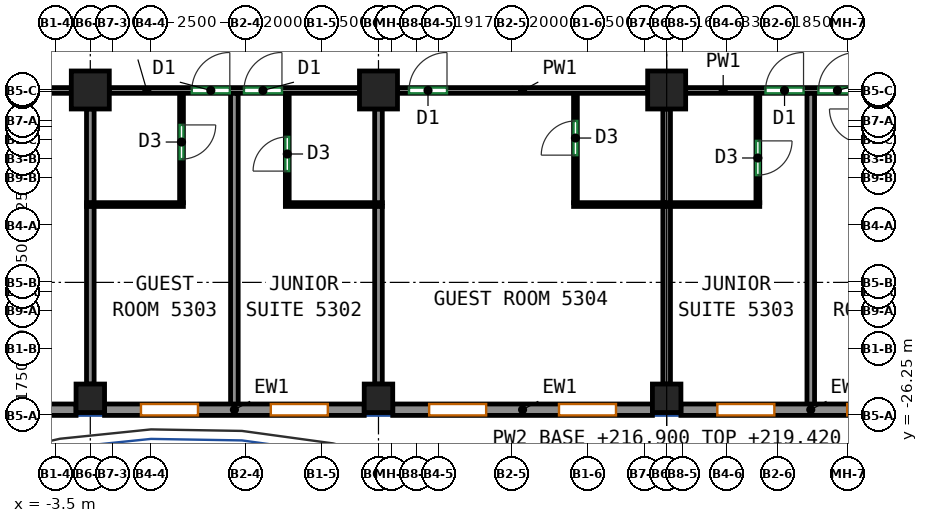
"""IFC4 building model, lengths in metres.
Left out: names, types, materials, properties, quantities, classifications, styles, units other than length and angle.
Written with IfcOpenShell. Run it as: python <this file> out.ifc"""

import sys

from ifc_helpers import new_model, si_unit, direction, frame, frame_2d, origin, origin_2d, place, context, subcontext, project, spatial, rectangle, extrude, source, transform, mapped, element, fill, save


model = new_model("IFC4")
c1 = context("Model", 3, precision=1e-05, world=origin(), true_north=direction((0.0, 1.0)))
c2 = subcontext(c1, "Body", "Model", "MODEL_VIEW")
j1 = project(units=[si_unit("LENGTHUNIT", "METRE"), si_unit("PLANEANGLEUNIT", "RADIAN")], contexts=[c1])
p1 = place(None, origin())
s1 = spatial("IfcSite", under=j1, at=p1, CompositionType="ELEMENT")
p2 = place(p1, origin())
s2 = spatial("IfcBuilding", under=s1, at=p2, CompositionType="ELEMENT")
p3 = place(p2, frame((0.0, 0.0, 216.9)))
s3 = spatial("IfcBuildingStorey", under=s2, at=p3, CompositionType="ELEMENT", Elevation=216.9)
m1 = source(origin(), c2, "Body", "SweptSolid", [
    extrude(rectangle(XDim=0.75, YDim=0.75, at=origin_2d()), origin(), (0.0, 0.0, 1.0), 3.12),
])
p4 = place(p3, frame((-2.583, -25.8, 0.0), z_axis=(0.0, 0.0, 1.0), x_axis=(1.0, 0.0, 0.0)))
e1 = element("IfcColumn", 1, at=p4, inside=s3, PredefinedType="COLUMN", context=c2, shape_type="MappedRepresentation", body=[
    mapped(m1, transform((0.0, 0.0, 0.0))),
])
m2 = source(origin(), c2, "Body", "SweptSolid", [
    extrude(rectangle(XDim=1.0, YDim=1.0, at=origin_2d()), origin(), (0.0, 0.0, 1.0), 3.12),
])
p5 = place(p3, frame((-2.583, -17.688, 0.0), z_axis=(0.0, 0.0, 1.0), x_axis=(1.0, 0.0, 0.0)))
e2 = element("IfcColumn", 2, at=p5, inside=s3, PredefinedType="COLUMN", context=c2, shape_type="MappedRepresentation", body=[
    mapped(m2, transform((0.0, 0.0, 0.0))),
])
p6 = place(p3, frame((5.0, -25.8, 0.0), z_axis=(0.0, 0.0, 1.0), x_axis=(1.0, 0.0, 0.0)))
e3 = element("IfcColumn", 3, at=p6, inside=s3, PredefinedType="COLUMN", context=c2, shape_type="MappedRepresentation", body=[
    mapped(m1, transform((0.0, 0.0, 0.0))),
])
p7 = place(p3, frame((5.0, -17.688, 0.0), z_axis=(0.0, 0.0, 1.0), x_axis=(1.0, 0.0, 0.0)))
e4 = element("IfcColumn", 4, at=p7, inside=s3, PredefinedType="COLUMN", context=c2, shape_type="MappedRepresentation", body=[
    mapped(m2, transform((0.0, 0.0, 0.0))),
])
p8 = place(p3, frame((12.583, -25.8, 0.0), z_axis=(0.0, 0.0, 1.0), x_axis=(1.0, 0.0, 0.0)))
e5 = element("IfcColumn", 5, at=p8, inside=s3, PredefinedType="COLUMN", context=c2, shape_type="MappedRepresentation", body=[
    mapped(m1, transform((0.0, 0.0, 0.0))),
])
p9 = place(p3, frame((12.583, -17.688, 0.0), z_axis=(0.0, 0.0, 1.0), x_axis=(1.0, 0.0, 0.0)))
e6 = element("IfcColumn", 6, at=p9, inside=s3, PredefinedType="COLUMN", context=c2, shape_type="MappedRepresentation", body=[
    mapped(m2, transform((0.0, 0.0, 0.0))),
])
m3 = source(origin(), c2, "Body", "SweptSolid", [
    extrude(rectangle(XDim=6.833, YDim=0.3, at=frame_2d((3.417, 0.0))), origin(), (0.0, 0.0, 1.0), 3.12),
])
p10 = place(p3, frame((-9.792, -26.1, 0.0), z_axis=(0.0, 0.0, 1.0), x_axis=(1.0, 0.0, 0.0)))
e7 = element("IfcWall", 7, at=p10, inside=s3, PredefinedType="SOLIDWALL", context=c2, shape_type="MappedRepresentation", body=[
    mapped(m3, transform((0.0, 0.0, 0.0))),
])
p11 = place(p10, frame((0.958, 0.0, 0.85)))
e8 = element("IfcOpeningElement", 8, at=p11, cuts=e7, PredefinedType="OPENING", context=c2, shape_type="SweptSolid", body=[
    extrude(rectangle(XDim=1.5, YDim=1.95, at=frame_2d((0.75, 0.975))), frame((0.0, 0.16, 0.0), z_axis=(0.0, -1.0, 0.0), x_axis=(1.0, 0.0, 0.0)), (0.0, 0.0, 1.0), 0.32),
])
p12 = place(p10, frame((4.375, 0.0, 0.85)))
e9 = element("IfcOpeningElement", 9, at=p12, cuts=e7, PredefinedType="OPENING", context=c2, shape_type="SweptSolid", body=[
    extrude(rectangle(XDim=1.5, YDim=1.95, at=frame_2d((0.75, 0.975))), frame((0.0, 0.16, 0.0), z_axis=(0.0, -1.0, 0.0), x_axis=(1.0, 0.0, 0.0)), (0.0, 0.0, 1.0), 0.32),
])
m4 = source(origin(), c2, "Body", "SweptSolid", [
    extrude(rectangle(XDim=6.833, YDim=0.3, at=frame_2d((3.417, 0.0))), origin(), (0.0, 0.0, 1.0), 3.12),
])
p13 = place(p3, frame((-2.208, -26.1, 0.0), z_axis=(0.0, 0.0, 1.0), x_axis=(1.0, 0.0, 0.0)))
e10 = element("IfcWall", 10, at=p13, inside=s3, PredefinedType="SOLIDWALL", context=c2, shape_type="MappedRepresentation", body=[
    mapped(m4, transform((0.0, 0.0, 0.0))),
])
p14 = place(p13, frame((0.958, 0.0, 0.85)))
e11 = element("IfcOpeningElement", 11, at=p14, cuts=e10, PredefinedType="OPENING", context=c2, shape_type="SweptSolid", body=[
    extrude(rectangle(XDim=1.5, YDim=1.95, at=frame_2d((0.75, 0.975))), frame((0.0, 0.16, 0.0), z_axis=(0.0, -1.0, 0.0), x_axis=(1.0, 0.0, 0.0)), (0.0, 0.0, 1.0), 0.32),
])
p15 = place(p13, frame((4.375, 0.0, 0.85)))
e12 = element("IfcOpeningElement", 12, at=p15, cuts=e10, PredefinedType="OPENING", context=c2, shape_type="SweptSolid", body=[
    extrude(rectangle(XDim=1.5, YDim=1.95, at=frame_2d((0.75, 0.975))), frame((0.0, 0.16, 0.0), z_axis=(0.0, -1.0, 0.0), x_axis=(1.0, 0.0, 0.0)), (0.0, 0.0, 1.0), 0.32),
])
p16 = place(p3, frame((5.375, -26.1, 0.0), z_axis=(0.0, 0.0, 1.0), x_axis=(1.0, 0.0, 0.0)))
e13 = element("IfcWall", 13, at=p16, inside=s3, PredefinedType="SOLIDWALL", context=c2, shape_type="MappedRepresentation", body=[
    mapped(m4, transform((0.0, 0.0, 0.0))),
])
p17 = place(p16, frame((0.958, 0.0, 0.85)))
e14 = element("IfcOpeningElement", 14, at=p17, cuts=e13, PredefinedType="OPENING", context=c2, shape_type="SweptSolid", body=[
    extrude(rectangle(XDim=1.5, YDim=1.95, at=frame_2d((0.75, 0.975))), frame((0.0, 0.16, 0.0), z_axis=(0.0, -1.0, 0.0), x_axis=(1.0, 0.0, 0.0)), (0.0, 0.0, 1.0), 0.32),
])
p18 = place(p16, frame((4.375, 0.0, 0.85)))
e15 = element("IfcOpeningElement", 15, at=p18, cuts=e13, PredefinedType="OPENING", context=c2, shape_type="SweptSolid", body=[
    extrude(rectangle(XDim=1.5, YDim=1.95, at=frame_2d((0.75, 0.975))), frame((0.0, 0.16, 0.0), z_axis=(0.0, -1.0, 0.0), x_axis=(1.0, 0.0, 0.0)), (0.0, 0.0, 1.0), 0.32),
])
p19 = place(p3, frame((12.958, -26.1, 0.0), z_axis=(0.0, 0.0, 1.0), x_axis=(1.0, 0.0, 0.0)))
e16 = element("IfcWall", 16, at=p19, inside=s3, PredefinedType="SOLIDWALL", context=c2, shape_type="MappedRepresentation", body=[
    mapped(m3, transform((0.0, 0.0, 0.0))),
])
p20 = place(p19, frame((0.958, 0.0, 0.85)))
e17 = element("IfcOpeningElement", 17, at=p20, cuts=e16, PredefinedType="OPENING", context=c2, shape_type="SweptSolid", body=[
    extrude(rectangle(XDim=1.5, YDim=1.95, at=frame_2d((0.75, 0.975))), frame((0.0, 0.16, 0.0), z_axis=(0.0, -1.0, 0.0), x_axis=(1.0, 0.0, 0.0)), (0.0, 0.0, 1.0), 0.32),
])
p21 = place(p19, frame((4.375, 0.0, 0.85)))
e18 = element("IfcOpeningElement", 18, at=p21, cuts=e16, PredefinedType="OPENING", context=c2, shape_type="SweptSolid", body=[
    extrude(rectangle(XDim=1.5, YDim=1.95, at=frame_2d((0.75, 0.975))), frame((0.0, 0.16, 0.0), z_axis=(0.0, -1.0, 0.0), x_axis=(1.0, 0.0, 0.0)), (0.0, 0.0, 1.0), 0.32),
])
p22 = place(p3, frame((-9.667, -17.7, 0.0), z_axis=(0.0, 0.0, 1.0), x_axis=(1.0, 0.0, 0.0)))
e19 = element("IfcWall", 19, at=p22, inside=s3, PredefinedType="PARTITIONING", context=c2, shape_type="SweptSolid", body=[
    extrude(rectangle(XDim=6.584, YDim=0.15, at=frame_2d((3.292, 0.0))), origin(), (0.0, 0.0, 1.0), 3.12),
])
p23 = place(p22, frame((3.119, 0.0, 0.0)))
e20 = element("IfcOpeningElement", 20, at=p23, cuts=e19, PredefinedType="OPENING", context=c2, shape_type="SweptSolid", body=[
    extrude(rectangle(XDim=1.0, YDim=2.1, at=frame_2d((0.5, 1.05))), frame((0.0, 0.085, 0.0), z_axis=(0.0, -1.0, 0.0), x_axis=(1.0, 0.0, 0.0)), (0.0, 0.0, 1.0), 0.17),
])
p24 = place(p3, frame((-2.083, -17.7, 0.0), z_axis=(0.0, 0.0, 1.0), x_axis=(1.0, 0.0, 0.0)))
e21 = element("IfcWall", 21, at=p24, inside=s3, PredefinedType="PARTITIONING", context=c2, shape_type="SweptSolid", body=[
    extrude(rectangle(XDim=6.583, YDim=0.15, at=frame_2d((3.292, 0.0))), origin(), (0.0, 0.0, 1.0), 3.12),
])
p25 = place(p24, frame((2.171, 0.0, 0.0)))
e22 = element("IfcOpeningElement", 22, at=p25, cuts=e21, PredefinedType="OPENING", context=c2, shape_type="SweptSolid", body=[
    extrude(rectangle(XDim=1.0, YDim=2.1, at=frame_2d((0.5, 1.05))), frame((0.0, 0.085, 0.0), z_axis=(0.0, -1.0, 0.0), x_axis=(1.0, 0.0, 0.0)), (0.0, 0.0, 1.0), 0.17),
])
p26 = place(p24, frame((3.543, 0.0, 0.0)))
e23 = element("IfcOpeningElement", 23, at=p26, cuts=e21, PredefinedType="OPENING", context=c2, shape_type="SweptSolid", body=[
    extrude(rectangle(XDim=1.0, YDim=2.1, at=frame_2d((0.5, 1.05))), frame((0.0, 0.085, 0.0), z_axis=(0.0, -1.0, 0.0), x_axis=(1.0, 0.0, 0.0)), (0.0, 0.0, 1.0), 0.17),
])
p27 = place(p3, frame((5.5, -17.7, 0.0), z_axis=(0.0, 0.0, 1.0), x_axis=(1.0, 0.0, 0.0)))
e24 = element("IfcWall", 24, at=p27, inside=s3, PredefinedType="PARTITIONING", context=c2, shape_type="SweptSolid", body=[
    extrude(rectangle(XDim=6.583, YDim=0.15, at=frame_2d((3.292, 0.0))), origin(), (0.0, 0.0, 1.0), 3.12),
])
p28 = place(p27, frame((0.303, 0.0, 0.0)))
e25 = element("IfcOpeningElement", 25, at=p28, cuts=e24, PredefinedType="OPENING", context=c2, shape_type="SweptSolid", body=[
    extrude(rectangle(XDim=1.0, YDim=2.1, at=frame_2d((0.5, 1.05))), frame((0.0, 0.085, 0.0), z_axis=(0.0, -1.0, 0.0), x_axis=(1.0, 0.0, 0.0)), (0.0, 0.0, 1.0), 0.17),
])
p29 = place(p3, frame((13.083, -17.7, 0.0), z_axis=(0.0, 0.0, 1.0), x_axis=(1.0, 0.0, 0.0)))
e26 = element("IfcWall", 26, at=p29, inside=s3, PredefinedType="PARTITIONING", context=c2, shape_type="SweptSolid", body=[
    extrude(rectangle(XDim=6.584, YDim=0.15, at=frame_2d((3.292, 0.0))), origin(), (0.0, 0.0, 1.0), 3.12),
])
p30 = place(p29, frame((2.102, 0.0, 0.0)))
e27 = element("IfcOpeningElement", 27, at=p30, cuts=e26, PredefinedType="OPENING", context=c2, shape_type="SweptSolid", body=[
    extrude(rectangle(XDim=1.0, YDim=2.1, at=frame_2d((0.5, 1.05))), frame((0.0, 0.085, 0.0), z_axis=(0.0, -1.0, 0.0), x_axis=(1.0, 0.0, 0.0)), (0.0, 0.0, 1.0), 0.17),
])
p31 = place(p29, frame((3.494, 0.0, 0.0)))
e28 = element("IfcOpeningElement", 28, at=p31, cuts=e26, PredefinedType="OPENING", context=c2, shape_type="SweptSolid", body=[
    extrude(rectangle(XDim=1.0, YDim=2.1, at=frame_2d((0.5, 1.05))), frame((0.0, 0.085, 0.0), z_axis=(0.0, -1.0, 0.0), x_axis=(1.0, 0.0, 0.0)), (0.0, 0.0, 1.0), 0.17),
])
p32 = place(p3, frame((-2.583, -25.425, 0.0), z_axis=(0.0, 0.0, 1.0), x_axis=(0.0, 1.0, 0.0)))
e29 = element("IfcWall", 29, at=p32, inside=s3, PredefinedType="PARTITIONING", context=c2, shape_type="SweptSolid", body=[
    extrude(rectangle(XDim=4.683, YDim=0.2, at=frame_2d((2.342, 0.0))), origin(), (0.0, 0.0, 1.0), 3.12),
])
p33 = place(p3, frame((-2.583, -20.662, 0.0), z_axis=(0.0, 0.0, 1.0), x_axis=(0.0, 1.0, 0.0)))
e30 = element("IfcWall", 30, at=p33, inside=s3, PredefinedType="PARTITIONING", context=c2, shape_type="SweptSolid", body=[
    extrude(rectangle(XDim=2.474, YDim=0.2, at=frame_2d((1.237, 0.0))), origin(), (0.0, 0.0, 1.0), 3.12),
])
p34 = place(p3, frame((-0.183, -17.777, 0.0), z_axis=(0.0, 0.0, 1.0), x_axis=(0.0, -1.0, 0.0)))
e31 = element("IfcWall", 31, at=p34, inside=s3, PredefinedType="PARTITIONING", context=c2, shape_type="SweptSolid", body=[
    extrude(rectangle(XDim=2.875, YDim=0.1, at=frame_2d((1.438, 0.0))), origin(), (0.0, 0.0, 1.0), 3.12),
])
p35 = place(p34, frame((0.83, 0.0, 0.0)))
e32 = element("IfcOpeningElement", 32, at=p35, cuts=e31, PredefinedType="OPENING", context=c2, shape_type="SweptSolid", body=[
    extrude(rectangle(XDim=0.9, YDim=2.1, at=frame_2d((0.45, 1.05))), frame((0.0, 0.06, 0.0), z_axis=(0.0, -1.0, 0.0), x_axis=(1.0, 0.0, 0.0)), (0.0, 0.0, 1.0), 0.12),
])
p36 = place(p3, frame((-2.683, -20.702, 0.0), z_axis=(0.0, 0.0, 1.0), x_axis=(1.0, 0.0, 0.0)))
e33 = element("IfcWall", 33, at=p36, inside=s3, PredefinedType="PARTITIONING", context=c2, shape_type="SweptSolid", body=[
    extrude(rectangle(XDim=2.55, YDim=0.1, at=frame_2d((1.275, 0.0))), origin(), (0.0, 0.0, 1.0), 3.12),
])
p37 = place(p3, frame((1.208, -26.0, 0.0), z_axis=(0.0, 0.0, 1.0), x_axis=(0.0, 1.0, 0.0)))
e34 = element("IfcWall", 34, at=p37, inside=s3, PredefinedType="PARTITIONING", context=c2, shape_type="SweptSolid", body=[
    extrude(rectangle(XDim=8.223, YDim=0.2, at=frame_2d((4.111, 0.0))), origin(), (0.0, 0.0, 1.0), 3.12),
])
p38 = place(p3, frame((2.6, -20.652, 0.0), z_axis=(0.0, 0.0, 1.0), x_axis=(0.0, 1.0, 0.0)))
e35 = element("IfcWall", 35, at=p38, inside=s3, PredefinedType="PARTITIONING", context=c2, shape_type="SweptSolid", body=[
    extrude(rectangle(XDim=2.875, YDim=0.1, at=frame_2d((1.438, 0.0))), origin(), (0.0, 0.0, 1.0), 3.12),
])
p39 = place(p38, frame((0.83, 0.0, 0.0)))
e36 = element("IfcOpeningElement", 36, at=p39, cuts=e35, PredefinedType="OPENING", context=c2, shape_type="SweptSolid", body=[
    extrude(rectangle(XDim=0.9, YDim=2.1, at=frame_2d((0.45, 1.05))), frame((0.0, 0.06, 0.0), z_axis=(0.0, -1.0, 0.0), x_axis=(1.0, 0.0, 0.0)), (0.0, 0.0, 1.0), 0.12),
])
p40 = place(p3, frame((2.55, -20.702, 0.0), z_axis=(0.0, 0.0, 1.0), x_axis=(1.0, 0.0, 0.0)))
e37 = element("IfcWall", 37, at=p40, inside=s3, PredefinedType="PARTITIONING", context=c2, shape_type="SweptSolid", body=[
    extrude(rectangle(XDim=2.55, YDim=0.1, at=frame_2d((1.275, 0.0))), origin(), (0.0, 0.0, 1.0), 3.12),
])
p41 = place(p3, frame((5.0, -25.425, 0.0), z_axis=(0.0, 0.0, 1.0), x_axis=(0.0, 1.0, 0.0)))
e38 = element("IfcWall", 38, at=p41, inside=s3, PredefinedType="PARTITIONING", context=c2, shape_type="SweptSolid", body=[
    extrude(rectangle(XDim=4.673, YDim=0.2, at=frame_2d((2.336, 0.0))), origin(), (0.0, 0.0, 1.0), 3.12),
])
p42 = place(p3, frame((5.0, -20.652, 0.0), z_axis=(0.0, 0.0, 1.0), x_axis=(0.0, 1.0, 0.0)))
e39 = element("IfcWall", 39, at=p42, inside=s3, PredefinedType="PARTITIONING", context=c2, shape_type="SweptSolid", body=[
    extrude(rectangle(XDim=2.464, YDim=0.2, at=frame_2d((1.232, 0.0))), origin(), (0.0, 0.0, 1.0), 3.12),
])
p43 = place(p3, frame((10.183, -20.652, 0.0), z_axis=(0.0, 0.0, 1.0), x_axis=(0.0, 1.0, 0.0)))
e40 = element("IfcWall", 40, at=p43, inside=s3, PredefinedType="PARTITIONING", context=c2, shape_type="SweptSolid", body=[
    extrude(rectangle(XDim=2.875, YDim=0.1, at=frame_2d((1.438, 0.0))), origin(), (0.0, 0.0, 1.0), 3.12),
])
p44 = place(p43, frame((1.25, 0.0, 0.0)))
e41 = element("IfcOpeningElement", 41, at=p44, cuts=e40, PredefinedType="OPENING", context=c2, shape_type="SweptSolid", body=[
    extrude(rectangle(XDim=0.9, YDim=2.1, at=frame_2d((0.45, 1.05))), frame((0.0, 0.06, 0.0), z_axis=(0.0, -1.0, 0.0), x_axis=(1.0, 0.0, 0.0)), (0.0, 0.0, 1.0), 0.12),
])
p45 = place(p3, frame((10.133, -20.702, 0.0), z_axis=(0.0, 0.0, 1.0), x_axis=(1.0, 0.0, 0.0)))
e42 = element("IfcWall", 42, at=p45, inside=s3, PredefinedType="PARTITIONING", context=c2, shape_type="SweptSolid", body=[
    extrude(rectangle(XDim=4.9, YDim=0.1, at=frame_2d((2.45, 0.0))), origin(), (0.0, 0.0, 1.0), 3.12),
])
p46 = place(p3, frame((12.583, -25.425, 0.0), z_axis=(0.0, 0.0, 1.0), x_axis=(0.0, 1.0, 0.0)))
e43 = element("IfcWall", 43, at=p46, inside=s3, PredefinedType="PARTITIONING", context=c2, shape_type="SweptSolid", body=[
    extrude(rectangle(XDim=4.673, YDim=0.2, at=frame_2d((2.336, 0.0))), origin(), (0.0, 0.0, 1.0), 3.12),
])
p47 = place(p3, frame((12.583, -20.652, 0.0), z_axis=(0.0, 0.0, 1.0), x_axis=(0.0, 1.0, 0.0)))
e44 = element("IfcWall", 44, at=p47, inside=s3, PredefinedType="PARTITIONING", context=c2, shape_type="SweptSolid", body=[
    extrude(rectangle(XDim=2.464, YDim=0.2, at=frame_2d((1.232, 0.0))), origin(), (0.0, 0.0, 1.0), 3.12),
])
p48 = place(p3, frame((14.983, -17.777, 0.0), z_axis=(0.0, 0.0, 1.0), x_axis=(0.0, -1.0, 0.0)))
e45 = element("IfcWall", 45, at=p48, inside=s3, PredefinedType="PARTITIONING", context=c2, shape_type="SweptSolid", body=[
    extrude(rectangle(XDim=2.875, YDim=0.1, at=frame_2d((1.438, 0.0))), origin(), (0.0, 0.0, 1.0), 3.12),
])
p49 = place(p48, frame((1.25, 0.0, 0.0)))
e46 = element("IfcOpeningElement", 46, at=p49, cuts=e45, PredefinedType="OPENING", context=c2, shape_type="SweptSolid", body=[
    extrude(rectangle(XDim=0.9, YDim=2.1, at=frame_2d((0.45, 1.05))), frame((0.0, 0.06, 0.0), z_axis=(0.0, -1.0, 0.0), x_axis=(1.0, 0.0, 0.0)), (0.0, 0.0, 1.0), 0.12),
])
p50 = place(p3, frame((16.375, -26.0, 0.0), z_axis=(0.0, 0.0, 1.0), x_axis=(0.0, 1.0, 0.0)))
e47 = element("IfcWall", 47, at=p50, inside=s3, PredefinedType="PARTITIONING", context=c2, shape_type="SweptSolid", body=[
    extrude(rectangle(XDim=8.223, YDim=0.2, at=frame_2d((4.111, 0.0))), origin(), (0.0, 0.0, 1.0), 3.12),
])
p51 = place(p14, origin())
e48 = element("IfcWindow", 48, at=p51, inside=s3, PartitioningType="SINGLE_PANEL", PredefinedType="WINDOW", context=c2, shape_type="SweptSolid", body=[
    extrude(rectangle(XDim=1.5, YDim=1.95, at=frame_2d((0.75, 0.975))), frame((0.0, 0.03, 0.0), z_axis=(0.0, -1.0, 0.0), x_axis=(1.0, 0.0, 0.0)), (0.0, 0.0, 1.0), 0.06),
])
fill(e11, e48)
p52 = place(p15, origin())
e49 = element("IfcWindow", 49, at=p52, inside=s3, PartitioningType="SINGLE_PANEL", PredefinedType="WINDOW", context=c2, shape_type="SweptSolid", body=[
    extrude(rectangle(XDim=1.5, YDim=1.95, at=frame_2d((0.75, 0.975))), frame((0.0, 0.03, 0.0), z_axis=(0.0, -1.0, 0.0), x_axis=(1.0, 0.0, 0.0)), (0.0, 0.0, 1.0), 0.06),
])
fill(e12, e49)
p53 = place(p17, origin())
e50 = element("IfcWindow", 50, at=p53, inside=s3, PartitioningType="SINGLE_PANEL", PredefinedType="WINDOW", context=c2, shape_type="SweptSolid", body=[
    extrude(rectangle(XDim=1.5, YDim=1.95, at=frame_2d((0.75, 0.975))), frame((0.0, 0.03, 0.0), z_axis=(0.0, -1.0, 0.0), x_axis=(1.0, 0.0, 0.0)), (0.0, 0.0, 1.0), 0.06),
])
fill(e14, e50)
p54 = place(p18, origin())
e51 = element("IfcWindow", 51, at=p54, inside=s3, PartitioningType="SINGLE_PANEL", PredefinedType="WINDOW", context=c2, shape_type="SweptSolid", body=[
    extrude(rectangle(XDim=1.5, YDim=1.95, at=frame_2d((0.75, 0.975))), frame((0.0, 0.03, 0.0), z_axis=(0.0, -1.0, 0.0), x_axis=(1.0, 0.0, 0.0)), (0.0, 0.0, 1.0), 0.06),
])
fill(e15, e51)
p55 = place(p20, origin())
e52 = element("IfcWindow", 52, at=p55, inside=s3, PartitioningType="SINGLE_PANEL", PredefinedType="WINDOW", context=c2, shape_type="SweptSolid", body=[
    extrude(rectangle(XDim=1.5, YDim=1.95, at=frame_2d((0.75, 0.975))), frame((0.0, 0.03, 0.0), z_axis=(0.0, -1.0, 0.0), x_axis=(1.0, 0.0, 0.0)), (0.0, 0.0, 1.0), 0.06),
])
fill(e17, e52)
p56 = place(p21, origin())
e53 = element("IfcWindow", 53, at=p56, inside=s3, PartitioningType="SINGLE_PANEL", PredefinedType="WINDOW", context=c2, shape_type="SweptSolid", body=[
    extrude(rectangle(XDim=1.5, YDim=1.95, at=frame_2d((0.75, 0.975))), frame((0.0, 0.03, 0.0), z_axis=(0.0, -1.0, 0.0), x_axis=(1.0, 0.0, 0.0)), (0.0, 0.0, 1.0), 0.06),
])
fill(e18, e53)
p57 = place(p49, origin())
e54 = element("IfcDoor", 54, at=p57, inside=s3, OperationType="SINGLE_SWING_LEFT", PredefinedType="DOOR", context=c2, shape_type="SweptSolid", body=[
    extrude(rectangle(XDim=0.9, YDim=2.1, at=frame_2d((0.45, 1.05))), frame((0.0, 0.025, 0.0), z_axis=(0.0, -1.0, 0.0), x_axis=(1.0, 0.0, 0.0)), (0.0, 0.0, 1.0), 0.05),
])
fill(e46, e54)
p58 = place(p39, origin())
e55 = element("IfcDoor", 55, at=p58, inside=s3, OperationType="SINGLE_SWING_LEFT", PredefinedType="DOOR", context=c2, shape_type="SweptSolid", body=[
    extrude(rectangle(XDim=0.9, YDim=2.1, at=frame_2d((0.45, 1.05))), frame((0.0, 0.025, 0.0), z_axis=(0.0, -1.0, 0.0), x_axis=(1.0, 0.0, 0.0)), (0.0, 0.0, 1.0), 0.05),
])
fill(e36, e55)
p59 = place(p35, origin())
e56 = element("IfcDoor", 56, at=p59, inside=s3, OperationType="SINGLE_SWING_LEFT", PredefinedType="DOOR", context=c2, shape_type="SweptSolid", body=[
    extrude(rectangle(XDim=0.9, YDim=2.1, at=frame_2d((0.45, 1.05))), frame((0.0, 0.025, 0.0), z_axis=(0.0, -1.0, 0.0), x_axis=(1.0, 0.0, 0.0)), (0.0, 0.0, 1.0), 0.05),
])
fill(e32, e56)
p60 = place(p44, origin())
e57 = element("IfcDoor", 57, at=p60, inside=s3, OperationType="SINGLE_SWING_LEFT", PredefinedType="DOOR", context=c2, shape_type="SweptSolid", body=[
    extrude(rectangle(XDim=0.9, YDim=2.1, at=frame_2d((0.45, 1.05))), frame((0.0, 0.025, 0.0), z_axis=(0.0, -1.0, 0.0), x_axis=(1.0, 0.0, 0.0)), (0.0, 0.0, 1.0), 0.05),
])
fill(e41, e57)
p61 = place(p25, origin())
e58 = element("IfcDoor", 58, at=p61, inside=s3, OperationType="SINGLE_SWING_RIGHT", PredefinedType="DOOR", context=c2, shape_type="SweptSolid", body=[
    extrude(rectangle(XDim=1.0, YDim=2.1, at=frame_2d((0.5, 1.05))), frame((0.0, 0.025, 0.0), z_axis=(0.0, -1.0, 0.0), x_axis=(1.0, 0.0, 0.0)), (0.0, 0.0, 1.0), 0.05),
])
fill(e22, e58)
p62 = place(p26, origin())
e59 = element("IfcDoor", 59, at=p62, inside=s3, OperationType="SINGLE_SWING_RIGHT", PredefinedType="DOOR", context=c2, shape_type="SweptSolid", body=[
    extrude(rectangle(XDim=1.0, YDim=2.1, at=frame_2d((0.5, 1.05))), frame((0.0, 0.025, 0.0), z_axis=(0.0, -1.0, 0.0), x_axis=(1.0, 0.0, 0.0)), (0.0, 0.0, 1.0), 0.05),
])
fill(e23, e59)
p63 = place(p28, origin())
e60 = element("IfcDoor", 60, at=p63, inside=s3, OperationType="SINGLE_SWING_RIGHT", PredefinedType="DOOR", context=c2, shape_type="SweptSolid", body=[
    extrude(rectangle(XDim=1.0, YDim=2.1, at=frame_2d((0.5, 1.05))), frame((0.0, 0.025, 0.0), z_axis=(0.0, -1.0, 0.0), x_axis=(1.0, 0.0, 0.0)), (0.0, 0.0, 1.0), 0.05),
])
fill(e25, e60)
p64 = place(p30, origin())
e61 = element("IfcDoor", 61, at=p64, inside=s3, OperationType="SINGLE_SWING_RIGHT", PredefinedType="DOOR", context=c2, shape_type="SweptSolid", body=[
    extrude(rectangle(XDim=1.0, YDim=2.1, at=frame_2d((0.5, 1.05))), frame((0.0, 0.025, 0.0), z_axis=(0.0, -1.0, 0.0), x_axis=(1.0, 0.0, 0.0)), (0.0, 0.0, 1.0), 0.05),
])
fill(e27, e61)
p65 = place(p31, origin())
e62 = element("IfcDoor", 62, at=p65, inside=s3, OperationType="SINGLE_SWING_RIGHT", PredefinedType="DOOR", context=c2, shape_type="SweptSolid", body=[
    extrude(rectangle(XDim=1.0, YDim=2.1, at=frame_2d((0.5, 1.05))), frame((0.0, 0.025, 0.0), z_axis=(0.0, -1.0, 0.0), x_axis=(1.0, 0.0, 0.0)), (0.0, 0.0, 1.0), 0.05),
])
fill(e28, e62)
save(model, sys.argv[1])
